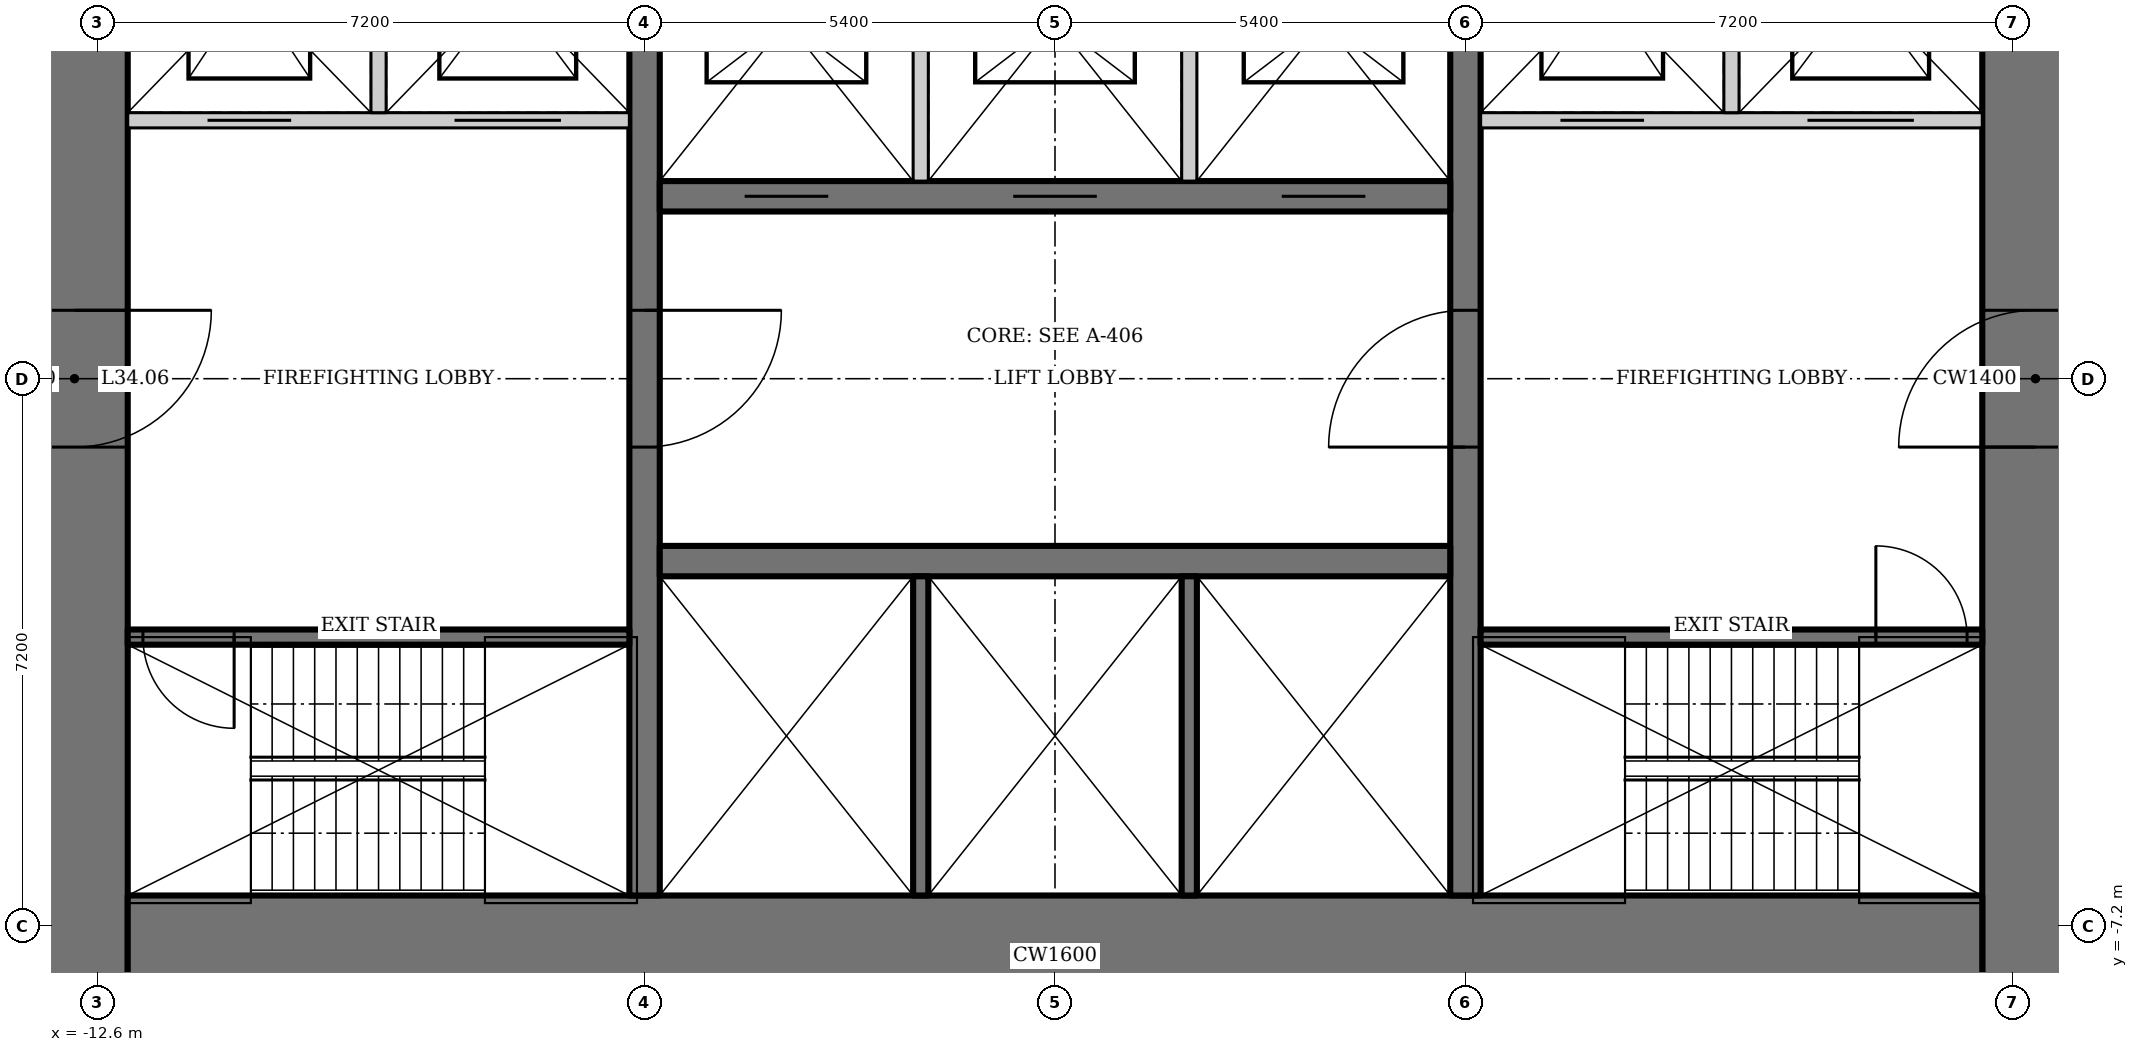
"""IFC4 building model, lengths in metres.
Left out: names, types, materials, properties, quantities, classifications, styles, units other than length and angle.
Written with IfcOpenShell. Run it as: python <this file> out.ifc"""

import sys

from ifc_helpers import new_model, si_unit, direction, frame, frame_2d, origin, place, context, subcontext, project, spatial, rectangle, extrude, element, fill, save


model = new_model("IFC4")
c1 = context("Model", 3, precision=1e-05, world=origin(), true_north=direction((0.0, 1.0)))
c2 = subcontext(c1, "Body", "Model", "MODEL_VIEW")
j1 = project(units=[si_unit("LENGTHUNIT", "METRE"), si_unit("PLANEANGLEUNIT", "RADIAN")], contexts=[c1])
p1 = place(None, origin())
s1 = spatial("IfcSite", under=j1, at=p1, CompositionType="ELEMENT")
p2 = place(p1, origin())
s2 = spatial("IfcBuilding", under=s1, at=p2, CompositionType="ELEMENT")
p3 = place(p2, frame((0.0, 0.0, 146.8)))
s3 = spatial("IfcBuildingStorey", under=s2, at=p3, CompositionType="ELEMENT", Elevation=146.8)
p4 = place(p3, frame((12.9, -13.0, 0.0), z_axis=(0.0, 0.0, 1.0), x_axis=(0.0, 1.0, 0.0)))
e1 = element("IfcWall", 1, at=p4, inside=s3, PredefinedType="SHEAR", context=c2, shape_type="SweptSolid", body=[
    extrude(rectangle(XDim=26.0, YDim=1.4, at=frame_2d((13.0, 0.0))), origin(), (0.0, 0.0, 1.0), 4.2),
])
p5 = place(p4, frame((12.1, 0.0, 0.0)))
e2 = element("IfcOpeningElement", 2, at=p5, cuts=e1, PredefinedType="OPENING", context=c2, shape_type="SweptSolid", body=[
    extrude(rectangle(XDim=1.8, YDim=2.1, at=frame_2d((0.9, 1.05))), frame((0.0, 0.71, 0.0), z_axis=(0.0, -1.0, 0.0), x_axis=(1.0, 0.0, 0.0)), (0.0, 0.0, 1.0), 1.42),
])
p6 = place(p3, frame((-12.9, 13.0, 0.0), z_axis=(0.0, 0.0, 1.0), x_axis=(0.0, -1.0, 0.0)))
e3 = element("IfcWall", 3, at=p6, inside=s3, PredefinedType="SHEAR", context=c2, shape_type="SweptSolid", body=[
    extrude(rectangle(XDim=26.0, YDim=1.4, at=frame_2d((13.0, 0.0))), origin(), (0.0, 0.0, 1.0), 4.2),
])
p7 = place(p6, frame((12.1, 0.0, 0.0)))
e4 = element("IfcOpeningElement", 4, at=p7, cuts=e3, PredefinedType="OPENING", context=c2, shape_type="SweptSolid", body=[
    extrude(rectangle(XDim=1.8, YDim=2.1, at=frame_2d((0.9, 1.05))), frame((0.0, 0.71, 0.0), z_axis=(0.0, -1.0, 0.0), x_axis=(1.0, 0.0, 0.0)), (0.0, 0.0, 1.0), 1.42),
])
p8 = place(p3, frame((-12.2, -7.6, 0.0), z_axis=(0.0, 0.0, 1.0), x_axis=(1.0, 0.0, 0.0)))
e5 = element("IfcWall", 5, at=p8, inside=s3, PredefinedType="SHEAR", context=c2, shape_type="SweptSolid", body=[
    extrude(rectangle(XDim=24.4, YDim=1.6, at=frame_2d((12.2, 0.0))), origin(), (0.0, 0.0, 1.0), 4.2),
])
p9 = place(p3, frame((5.4, -6.8, 0.0), z_axis=(0.0, 0.0, 1.0), x_axis=(0.0, 1.0, 0.0)))
e6 = element("IfcWall", 6, at=p9, inside=s3, PredefinedType="SHEAR", context=c2, shape_type="SweptSolid", body=[
    extrude(rectangle(XDim=13.6, YDim=0.4, at=frame_2d((6.8, 0.0))), origin(), (0.0, 0.0, 1.0), 4.2),
])
p10 = place(p9, frame((5.9, 0.0, 0.0)))
e7 = element("IfcOpeningElement", 7, at=p10, cuts=e6, PredefinedType="OPENING", context=c2, shape_type="SweptSolid", body=[
    extrude(rectangle(XDim=1.8, YDim=2.1, at=frame_2d((0.9, 1.05))), frame((0.0, 0.21, 0.0), z_axis=(0.0, -1.0, 0.0), x_axis=(1.0, 0.0, 0.0)), (0.0, 0.0, 1.0), 0.42),
])
p11 = place(p3, frame((-5.4, 6.8, 0.0), z_axis=(0.0, 0.0, 1.0), x_axis=(0.0, -1.0, 0.0)))
e8 = element("IfcWall", 8, at=p11, inside=s3, PredefinedType="SHEAR", context=c2, shape_type="SweptSolid", body=[
    extrude(rectangle(XDim=13.6, YDim=0.4, at=frame_2d((6.8, 0.0))), origin(), (0.0, 0.0, 1.0), 4.2),
])
p12 = place(p11, frame((5.9, 0.0, 0.0)))
e9 = element("IfcOpeningElement", 9, at=p12, cuts=e8, PredefinedType="OPENING", context=c2, shape_type="SweptSolid", body=[
    extrude(rectangle(XDim=1.8, YDim=2.1, at=frame_2d((0.9, 1.05))), frame((0.0, 0.21, 0.0), z_axis=(0.0, -1.0, 0.0), x_axis=(1.0, 0.0, 0.0)), (0.0, 0.0, 1.0), 0.42),
])
p13 = place(p3, frame((-5.2, -2.4, 0.0), z_axis=(0.0, 0.0, 1.0), x_axis=(1.0, 0.0, 0.0)))
e10 = element("IfcWall", 10, at=p13, inside=s3, PredefinedType="SHEAR", context=c2, shape_type="SweptSolid", body=[
    extrude(rectangle(XDim=10.4, YDim=0.4, at=frame_2d((5.2, 0.0))), origin(), (0.0, 0.0, 1.0), 4.2),
])
for number, where, z_axis, x_axis in (
    (11, (-1.767, -2.6, 0.0), (0.0, 0.0, 1.0), (0.0, -1.0, 0.0)),
    (12, (1.767, -2.6, 0.0), (0.0, 0.0, 1.0), (0.0, -1.0, 0.0)),
):
    element("IfcWall", number, at=place(p3, frame(where, z_axis=z_axis, x_axis=x_axis)), inside=s3, PredefinedType="SOLIDWALL", context=c2, shape_type="SweptSolid", body=[
        extrude(rectangle(XDim=4.2, YDim=0.2, at=frame_2d((2.1, 0.0))), origin(), (0.0, 0.0, 1.0), 4.2),
    ])
p14 = place(p3, frame((5.2, 2.4, 0.0), z_axis=(0.0, 0.0, 1.0), x_axis=(-1.0, 0.0, 0.0)))
e13 = element("IfcWall", 13, at=p14, inside=s3, PredefinedType="SHEAR", context=c2, shape_type="SweptSolid", body=[
    extrude(rectangle(XDim=10.4, YDim=0.4, at=frame_2d((5.2, 0.0))), origin(), (0.0, 0.0, 1.0), 4.2),
])
p15 = place(p14, frame((8.183, 0.0, 0.0)))
e14 = element("IfcOpeningElement", 14, at=p15, cuts=e13, PredefinedType="OPENING", context=c2, shape_type="SweptSolid", body=[
    extrude(rectangle(XDim=1.1, YDim=2.2, at=frame_2d((0.55, 1.1))), frame((0.0, 0.21, 0.0), z_axis=(0.0, -1.0, 0.0), x_axis=(1.0, 0.0, 0.0)), (0.0, 0.0, 1.0), 0.42),
])
p16 = place(p14, frame((4.65, 0.0, 0.0)))
e15 = element("IfcOpeningElement", 15, at=p16, cuts=e13, PredefinedType="OPENING", context=c2, shape_type="SweptSolid", body=[
    extrude(rectangle(XDim=1.1, YDim=2.2, at=frame_2d((0.55, 1.1))), frame((0.0, 0.21, 0.0), z_axis=(0.0, -1.0, 0.0), x_axis=(1.0, 0.0, 0.0)), (0.0, 0.0, 1.0), 0.42),
])
p17 = place(p14, frame((1.117, 0.0, 0.0)))
e16 = element("IfcOpeningElement", 16, at=p17, cuts=e13, PredefinedType="OPENING", context=c2, shape_type="SweptSolid", body=[
    extrude(rectangle(XDim=1.1, YDim=2.2, at=frame_2d((0.55, 1.1))), frame((0.0, 0.21, 0.0), z_axis=(0.0, -1.0, 0.0), x_axis=(1.0, 0.0, 0.0)), (0.0, 0.0, 1.0), 0.42),
])
for number, where, z_axis, x_axis in (
    (17, (-1.767, 2.6, 0.0), (0.0, 0.0, 1.0), (0.0, 1.0, 0.0)),
    (18, (1.767, 2.6, 0.0), (0.0, 0.0, 1.0), (0.0, 1.0, 0.0)),
):
    element("IfcWall", number, at=place(p3, frame(where, z_axis=z_axis, x_axis=x_axis)), inside=s3, PredefinedType="SOLIDWALL", context=c2, shape_type="SweptSolid", body=[
        extrude(rectangle(XDim=4.2, YDim=0.2, at=frame_2d((2.1, 0.0))), origin(), (0.0, 0.0, 1.0), 4.2),
    ])
p18 = place(p3, frame((5.6, -3.4, 0.0), z_axis=(0.0, 0.0, 1.0), x_axis=(1.0, 0.0, 0.0)))
e19 = element("IfcWall", 19, at=p18, inside=s3, PredefinedType="SHEAR", context=c2, shape_type="SweptSolid", body=[
    extrude(rectangle(XDim=6.6, YDim=0.2, at=frame_2d((3.3, 0.0))), origin(), (0.0, 0.0, 1.0), 4.2),
])
p19 = place(p18, frame((5.2, 0.0, 0.0)))
e20 = element("IfcOpeningElement", 20, at=p19, cuts=e19, PredefinedType="OPENING", context=c2, shape_type="SweptSolid", body=[
    extrude(rectangle(XDim=1.2, YDim=2.1, at=frame_2d((0.6, 1.05))), frame((0.0, 0.11, 0.0), z_axis=(0.0, -1.0, 0.0), x_axis=(1.0, 0.0, 0.0)), (0.0, 0.0, 1.0), 0.22),
])
p20 = place(p3, frame((12.2, 3.4, 0.0), z_axis=(0.0, 0.0, 1.0), x_axis=(-1.0, 0.0, 0.0)))
e21 = element("IfcWall", 21, at=p20, inside=s3, PredefinedType="SOLIDWALL", context=c2, shape_type="SweptSolid", body=[
    extrude(rectangle(XDim=6.6, YDim=0.2, at=frame_2d((3.3, 0.0))), origin(), (0.0, 0.0, 1.0), 4.2),
])
p21 = place(p20, frame((4.45, 0.0, 0.0)))
e22 = element("IfcOpeningElement", 22, at=p21, cuts=e21, PredefinedType="OPENING", context=c2, shape_type="SweptSolid", body=[
    extrude(rectangle(XDim=1.1, YDim=2.2, at=frame_2d((0.55, 1.1))), frame((0.0, 0.11, 0.0), z_axis=(0.0, -1.0, 0.0), x_axis=(1.0, 0.0, 0.0)), (0.0, 0.0, 1.0), 0.22),
])
p22 = place(p20, frame((0.9, 0.0, 0.0)))
e23 = element("IfcOpeningElement", 23, at=p22, cuts=e21, PredefinedType="OPENING", context=c2, shape_type="SweptSolid", body=[
    extrude(rectangle(XDim=1.4, YDim=2.2, at=frame_2d((0.7, 1.1))), frame((0.0, 0.11, 0.0), z_axis=(0.0, -1.0, 0.0), x_axis=(1.0, 0.0, 0.0)), (0.0, 0.0, 1.0), 0.22),
])
p23 = place(p3, frame((8.9, 3.5, 0.0), z_axis=(0.0, 0.0, 1.0), x_axis=(0.0, 1.0, 0.0)))
e24 = element("IfcWall", 24, at=p23, inside=s3, PredefinedType="SOLIDWALL", context=c2, shape_type="SweptSolid", body=[
    extrude(rectangle(XDim=3.3, YDim=0.2, at=frame_2d((1.65, 0.0))), origin(), (0.0, 0.0, 1.0), 4.2),
])
p24 = place(p3, frame((-5.6, -3.4, 0.0), z_axis=(0.0, 0.0, 1.0), x_axis=(-1.0, 0.0, 0.0)))
e25 = element("IfcWall", 25, at=p24, inside=s3, PredefinedType="SHEAR", context=c2, shape_type="SweptSolid", body=[
    extrude(rectangle(XDim=6.6, YDim=0.2, at=frame_2d((3.3, 0.0))), origin(), (0.0, 0.0, 1.0), 4.2),
])
p25 = place(p24, frame((5.2, 0.0, 0.0)))
e26 = element("IfcOpeningElement", 26, at=p25, cuts=e25, PredefinedType="OPENING", context=c2, shape_type="SweptSolid", body=[
    extrude(rectangle(XDim=1.2, YDim=2.1, at=frame_2d((0.6, 1.05))), frame((0.0, 0.11, 0.0), z_axis=(0.0, -1.0, 0.0), x_axis=(1.0, 0.0, 0.0)), (0.0, 0.0, 1.0), 0.22),
])
p26 = place(p3, frame((-12.2, 3.4, 0.0), z_axis=(0.0, 0.0, 1.0), x_axis=(1.0, 0.0, 0.0)))
e27 = element("IfcWall", 27, at=p26, inside=s3, PredefinedType="SOLIDWALL", context=c2, shape_type="SweptSolid", body=[
    extrude(rectangle(XDim=6.6, YDim=0.2, at=frame_2d((3.3, 0.0))), origin(), (0.0, 0.0, 1.0), 4.2),
])
p27 = place(p26, frame((1.05, 0.0, 0.0)))
e28 = element("IfcOpeningElement", 28, at=p27, cuts=e27, PredefinedType="OPENING", context=c2, shape_type="SweptSolid", body=[
    extrude(rectangle(XDim=1.1, YDim=2.2, at=frame_2d((0.55, 1.1))), frame((0.0, 0.11, 0.0), z_axis=(0.0, -1.0, 0.0), x_axis=(1.0, 0.0, 0.0)), (0.0, 0.0, 1.0), 0.22),
])
p28 = place(p26, frame((4.3, 0.0, 0.0)))
e29 = element("IfcOpeningElement", 29, at=p28, cuts=e27, PredefinedType="OPENING", context=c2, shape_type="SweptSolid", body=[
    extrude(rectangle(XDim=1.4, YDim=2.2, at=frame_2d((0.7, 1.1))), frame((0.0, 0.11, 0.0), z_axis=(0.0, -1.0, 0.0), x_axis=(1.0, 0.0, 0.0)), (0.0, 0.0, 1.0), 0.22),
])
p29 = place(p3, frame((-8.9, 3.5, 0.0), z_axis=(0.0, 0.0, 1.0), x_axis=(0.0, 1.0, 0.0)))
e30 = element("IfcWall", 30, at=p29, inside=s3, PredefinedType="SOLIDWALL", context=c2, shape_type="SweptSolid", body=[
    extrude(rectangle(XDim=3.3, YDim=0.2, at=frame_2d((1.65, 0.0))), origin(), (0.0, 0.0, 1.0), 4.2),
])
p30 = place(p10, origin())
e31 = element("IfcDoor", 31, at=p30, inside=s3, OperationType="DOUBLE_DOOR_DOUBLE_SWING", PredefinedType="DOOR", context=c2, shape_type="SweptSolid", body=[
    extrude(rectangle(XDim=1.8, YDim=2.1, at=frame_2d((0.9, 1.05))), frame((0.0, 0.025, 0.0), z_axis=(0.0, -1.0, 0.0), x_axis=(1.0, 0.0, 0.0)), (0.0, 0.0, 1.0), 0.05),
])
fill(e7, e31)
p31 = place(p12, origin())
e32 = element("IfcDoor", 32, at=p31, inside=s3, OperationType="DOUBLE_DOOR_DOUBLE_SWING", PredefinedType="DOOR", context=c2, shape_type="SweptSolid", body=[
    extrude(rectangle(XDim=1.8, YDim=2.1, at=frame_2d((0.9, 1.05))), frame((0.0, 0.025, 0.0), z_axis=(0.0, -1.0, 0.0), x_axis=(1.0, 0.0, 0.0)), (0.0, 0.0, 1.0), 0.05),
])
fill(e9, e32)
p32 = place(p19, origin())
e33 = element("IfcDoor", 33, at=p32, inside=s3, OperationType="SINGLE_SWING_RIGHT", PredefinedType="DOOR", context=c2, shape_type="SweptSolid", body=[
    extrude(rectangle(XDim=1.2, YDim=2.1, at=frame_2d((0.6, 1.05))), frame((0.0, 0.025, 0.0), z_axis=(0.0, -1.0, 0.0), x_axis=(1.0, 0.0, 0.0)), (0.0, 0.0, 1.0), 0.05),
])
fill(e20, e33)
p33 = place(p25, origin())
e34 = element("IfcDoor", 34, at=p33, inside=s3, OperationType="SINGLE_SWING_RIGHT", PredefinedType="DOOR", context=c2, shape_type="SweptSolid", body=[
    extrude(rectangle(XDim=1.2, YDim=2.1, at=frame_2d((0.6, 1.05))), frame((0.0, 0.025, 0.0), z_axis=(0.0, -1.0, 0.0), x_axis=(1.0, 0.0, 0.0)), (0.0, 0.0, 1.0), 0.05),
])
fill(e26, e34)
p34 = place(p5, origin())
e35 = element("IfcDoor", 35, at=p34, inside=s3, OperationType="DOUBLE_DOOR_DOUBLE_SWING", PredefinedType="DOOR", context=c2, shape_type="SweptSolid", body=[
    extrude(rectangle(XDim=1.8, YDim=2.1, at=frame_2d((0.9, 1.05))), frame((0.0, 0.025, 0.0), z_axis=(0.0, -1.0, 0.0), x_axis=(1.0, 0.0, 0.0)), (0.0, 0.0, 1.0), 0.05),
])
fill(e2, e35)
p35 = place(p7, origin())
e36 = element("IfcDoor", 36, at=p35, inside=s3, OperationType="DOUBLE_DOOR_DOUBLE_SWING", PredefinedType="DOOR", context=c2, shape_type="SweptSolid", body=[
    extrude(rectangle(XDim=1.8, YDim=2.1, at=frame_2d((0.9, 1.05))), frame((0.0, 0.025, 0.0), z_axis=(0.0, -1.0, 0.0), x_axis=(1.0, 0.0, 0.0)), (0.0, 0.0, 1.0), 0.05),
])
fill(e4, e36)
p36 = place(p15, origin())
e37 = element("IfcDoor", 37, at=p36, inside=s3, OperationType="DOUBLE_DOOR_SLIDING", PredefinedType="DOOR", context=c2, shape_type="SweptSolid", body=[
    extrude(rectangle(XDim=1.1, YDim=2.2, at=frame_2d((0.55, 1.1))), frame((0.0, 0.025, 0.0), z_axis=(0.0, -1.0, 0.0), x_axis=(1.0, 0.0, 0.0)), (0.0, 0.0, 1.0), 0.05),
])
fill(e14, e37)
p37 = place(p16, origin())
e38 = element("IfcDoor", 38, at=p37, inside=s3, OperationType="DOUBLE_DOOR_SLIDING", PredefinedType="DOOR", context=c2, shape_type="SweptSolid", body=[
    extrude(rectangle(XDim=1.1, YDim=2.2, at=frame_2d((0.55, 1.1))), frame((0.0, 0.025, 0.0), z_axis=(0.0, -1.0, 0.0), x_axis=(1.0, 0.0, 0.0)), (0.0, 0.0, 1.0), 0.05),
])
fill(e15, e38)
p38 = place(p17, origin())
e39 = element("IfcDoor", 39, at=p38, inside=s3, OperationType="DOUBLE_DOOR_SLIDING", PredefinedType="DOOR", context=c2, shape_type="SweptSolid", body=[
    extrude(rectangle(XDim=1.1, YDim=2.2, at=frame_2d((0.55, 1.1))), frame((0.0, 0.025, 0.0), z_axis=(0.0, -1.0, 0.0), x_axis=(1.0, 0.0, 0.0)), (0.0, 0.0, 1.0), 0.05),
])
fill(e16, e39)
p39 = place(p27, origin())
e40 = element("IfcDoor", 40, at=p39, inside=s3, OperationType="DOUBLE_DOOR_SLIDING", PredefinedType="DOOR", context=c2, shape_type="SweptSolid", body=[
    extrude(rectangle(XDim=1.1, YDim=2.2, at=frame_2d((0.55, 1.1))), frame((0.0, 0.025, 0.0), z_axis=(0.0, -1.0, 0.0), x_axis=(1.0, 0.0, 0.0)), (0.0, 0.0, 1.0), 0.05),
])
fill(e28, e40)
p40 = place(p28, origin())
e41 = element("IfcDoor", 41, at=p40, inside=s3, OperationType="DOUBLE_DOOR_SLIDING", PredefinedType="DOOR", context=c2, shape_type="SweptSolid", body=[
    extrude(rectangle(XDim=1.4, YDim=2.2, at=frame_2d((0.7, 1.1))), frame((0.0, 0.025, 0.0), z_axis=(0.0, -1.0, 0.0), x_axis=(1.0, 0.0, 0.0)), (0.0, 0.0, 1.0), 0.05),
])
fill(e29, e41)
p41 = place(p21, origin())
e42 = element("IfcDoor", 42, at=p41, inside=s3, OperationType="DOUBLE_DOOR_SLIDING", PredefinedType="DOOR", context=c2, shape_type="SweptSolid", body=[
    extrude(rectangle(XDim=1.1, YDim=2.2, at=frame_2d((0.55, 1.1))), frame((0.0, 0.025, 0.0), z_axis=(0.0, -1.0, 0.0), x_axis=(1.0, 0.0, 0.0)), (0.0, 0.0, 1.0), 0.05),
])
fill(e22, e42)
p42 = place(p22, origin())
e43 = element("IfcDoor", 43, at=p42, inside=s3, OperationType="DOUBLE_DOOR_SLIDING", PredefinedType="DOOR", context=c2, shape_type="SweptSolid", body=[
    extrude(rectangle(XDim=1.4, YDim=2.2, at=frame_2d((0.7, 1.1))), frame((0.0, 0.025, 0.0), z_axis=(0.0, -1.0, 0.0), x_axis=(1.0, 0.0, 0.0)), (0.0, 0.0, 1.0), 0.05),
])
fill(e23, e43)
save(model, sys.argv[1])
